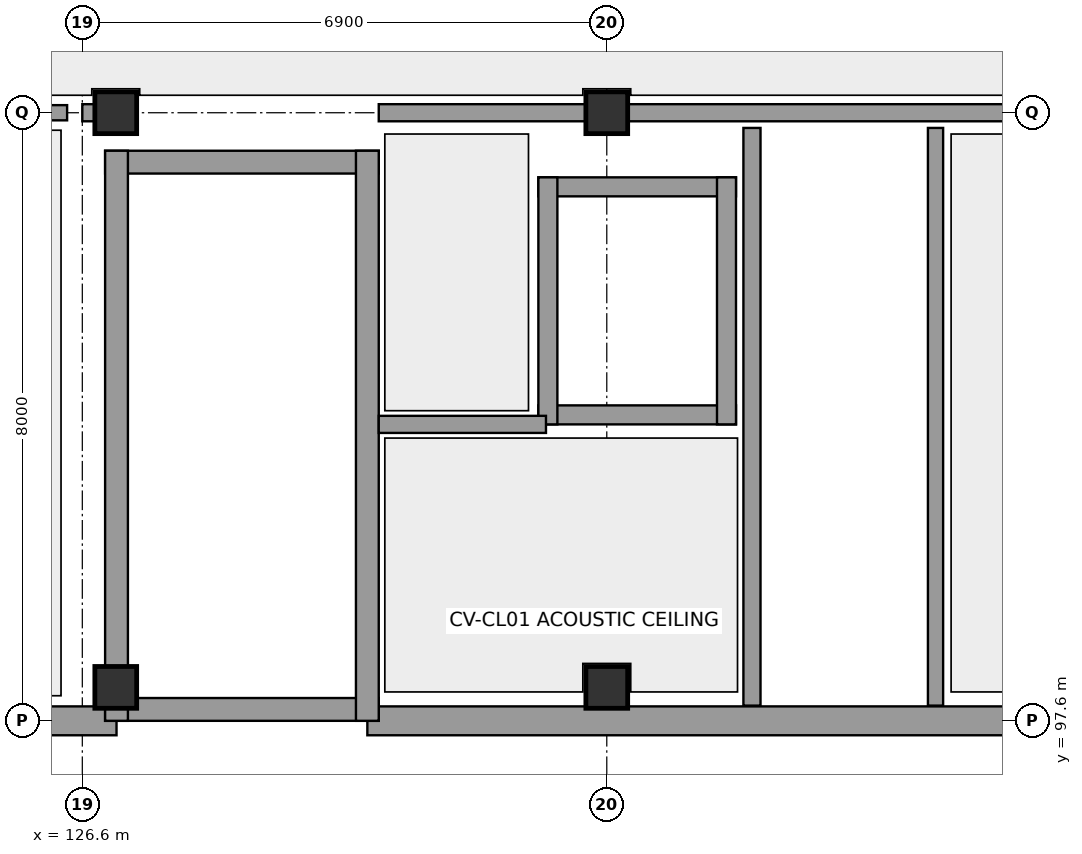
"""IFC4 building model, lengths in metres.
Left out: names, types, materials, properties, quantities, classifications, styles, units other than length and angle.
Written with IfcOpenShell. Run it as: python <this file> out.ifc"""

import sys

from ifc_helpers import new_model, si_unit, direction, frame, frame_2d, origin, origin_with_axes, origin_2d, place, context, subcontext, project, spatial, rectangle, extrude, element, fill, save


model = new_model("IFC4")
c1 = context("Model", 3, precision=1e-05, world=origin(), true_north=direction((0.0, 1.0)))
c2 = subcontext(c1, "Body", "Model", "MODEL_VIEW")
j1 = project(units=[si_unit("LENGTHUNIT", "METRE"), si_unit("PLANEANGLEUNIT", "RADIAN")], contexts=[c1])
p1 = place(None, origin())
s1 = spatial("IfcSite", under=j1, at=p1, CompositionType="ELEMENT")
p2 = place(p1, origin())
s2 = spatial("IfcBuilding", under=s1, at=p2, CompositionType="ELEMENT")
p3 = place(p2, origin())
s3 = spatial("IfcBuildingStorey", under=s2, at=p3, CompositionType="ELEMENT", Elevation=0.0)
for number, where, z_axis, x_axis in (
    (1, (127.04, 98.04, 0.0), (0.0, 0.0, 1.0), (1.0, 0.0, 0.0)),
    (2, (127.04, 105.6, 0.0), (0.0, 0.0, 1.0), (1.0, 0.0, 0.0)),
    (3, (133.5, 98.04, 0.0), (0.0, 0.0, 1.0), (1.0, 0.0, 0.0)),
    (4, (133.5, 105.6, 0.0), (0.0, 0.0, 1.0), (1.0, 0.0, 0.0)),
):
    element("IfcColumn", number, at=place(p3, frame(where, z_axis=z_axis, x_axis=x_axis)), inside=s3, PredefinedType="COLUMN", context=c2, shape_type="SweptSolid", body=[
        extrude(rectangle(XDim=0.55, YDim=0.55, at=origin_2d()), origin(), (0.0, 0.0, 1.0), 4.4),
    ])
p4 = place(p3, frame((125.65, 97.6, 0.0), z_axis=(0.0, 0.0, 1.0), x_axis=(1.0, 0.0, 0.0)))
e5 = element("IfcWall", 5, at=p4, inside=s3, PredefinedType="STANDARD", context=c2, shape_type="SweptSolid", body=[
    extrude(rectangle(XDim=1.4, YDim=0.38, at=frame_2d((0.7, 0.0))), origin(), (0.0, 0.0, 1.0), 4.12),
])
p5 = place(p3, frame((130.35, 97.6, 0.0), z_axis=(0.0, 0.0, 1.0), x_axis=(1.0, 0.0, 0.0)))
e6 = element("IfcWall", 6, at=p5, inside=s3, PredefinedType="STANDARD", context=c2, shape_type="SweptSolid", body=[
    extrude(rectangle(XDim=11.0, YDim=0.38, at=frame_2d((5.5, 0.0))), origin(), (0.0, 0.0, 1.0), 4.12),
])
p6 = place(p3, frame((126.9, 97.75, 0.0), z_axis=(0.0, 0.0, 1.0), x_axis=(1.0, 0.0, 0.0)))
e7 = element("IfcWall", 7, at=p6, inside=s3, PredefinedType="SHEAR", context=c2, shape_type="SweptSolid", body=[
    extrude(rectangle(XDim=3.6, YDim=0.3, at=frame_2d((1.8, 0.0))), origin(), (0.0, 0.0, 1.0), 4.12),
])
p7 = place(p6, frame((1.1, 0.0, 0.0)))
e8 = element("IfcOpeningElement", 8, at=p7, cuts=e7, PredefinedType="OPENING", context=c2, shape_type="SweptSolid", body=[
    extrude(rectangle(XDim=1.4, YDim=2.25, at=frame_2d((0.7, 1.125))), frame((0.0, 0.162, 0.0), z_axis=(0.0, -1.0, 0.0), x_axis=(1.0, 0.0, 0.0)), (0.0, 0.0, 1.0), 0.324),
])
p8 = place(p3, frame((126.9, 104.95, 0.0), z_axis=(0.0, 0.0, 1.0), x_axis=(1.0, 0.0, 0.0)))
e9 = element("IfcWall", 9, at=p8, inside=s3, PredefinedType="SHEAR", context=c2, shape_type="SweptSolid", body=[
    extrude(rectangle(XDim=3.6, YDim=0.3, at=frame_2d((1.8, 0.0))), origin(), (0.0, 0.0, 1.0), 4.12),
])
p9 = place(p3, frame((127.05, 97.6, 0.0), z_axis=(0.0, 0.0, 1.0), x_axis=(0.0, 1.0, 0.0)))
e10 = element("IfcWall", 10, at=p9, inside=s3, PredefinedType="SHEAR", context=c2, shape_type="SweptSolid", body=[
    extrude(rectangle(XDim=7.5, YDim=0.3, at=frame_2d((3.75, 0.0))), origin(), (0.0, 0.0, 1.0), 4.12),
])
p10 = place(p3, frame((130.35, 97.6, 0.0), z_axis=(0.0, 0.0, 1.0), x_axis=(0.0, 1.0, 0.0)))
e11 = element("IfcWall", 11, at=p10, inside=s3, PredefinedType="SHEAR", context=c2, shape_type="SweptSolid", body=[
    extrude(rectangle(XDim=7.5, YDim=0.3, at=frame_2d((3.75, 0.0))), origin(), (0.0, 0.0, 1.0), 4.12),
])
p11 = place(p10, frame((0.65, 0.0, 0.0)))
e12 = element("IfcOpeningElement", 12, at=p11, cuts=e11, PredefinedType="OPENING", context=c2, shape_type="SweptSolid", body=[
    extrude(rectangle(XDim=1.15, YDim=2.15, at=frame_2d((0.575, 1.075))), frame((0.0, 0.162, 0.0), z_axis=(0.0, -1.0, 0.0), x_axis=(1.0, 0.0, 0.0)), (0.0, 0.0, 1.0), 0.324),
])
p12 = place(p3, frame((132.6, 101.625, 0.0), z_axis=(0.0, 0.0, 1.0), x_axis=(1.0, 0.0, 0.0)))
e13 = element("IfcWall", 13, at=p12, inside=s3, PredefinedType="SHEAR", context=c2, shape_type="SweptSolid", body=[
    extrude(rectangle(XDim=2.6, YDim=0.25, at=frame_2d((1.3, 0.0))), origin(), (0.0, 0.0, 1.0), 4.12),
])
p13 = place(p12, frame((0.875, 0.0, 0.0)))
e14 = element("IfcOpeningElement", 14, at=p13, cuts=e13, PredefinedType="OPENING", context=c2, shape_type="SweptSolid", body=[
    extrude(rectangle(XDim=1.1, YDim=2.1, at=frame_2d((0.55, 1.05))), frame((0.0, 0.137, 0.0), z_axis=(0.0, -1.0, 0.0), x_axis=(1.0, 0.0, 0.0)), (0.0, 0.0, 1.0), 0.274),
])
p14 = place(p3, frame((132.6, 104.625, 0.0), z_axis=(0.0, 0.0, 1.0), x_axis=(1.0, 0.0, 0.0)))
e15 = element("IfcWall", 15, at=p14, inside=s3, PredefinedType="SHEAR", context=c2, shape_type="SweptSolid", body=[
    extrude(rectangle(XDim=2.6, YDim=0.25, at=frame_2d((1.3, 0.0))), origin(), (0.0, 0.0, 1.0), 4.12),
])
for number, where, z_axis, x_axis in (
    (16, (132.725, 101.5, 0.0), (0.0, 0.0, 1.0), (0.0, 1.0, 0.0)),
    (17, (135.075, 101.5, 0.0), (0.0, 0.0, 1.0), (0.0, 1.0, 0.0)),
):
    element("IfcWall", number, at=place(p3, frame(where, z_axis=z_axis, x_axis=x_axis)), inside=s3, PredefinedType="SHEAR", context=c2, shape_type="SweptSolid", body=[
        extrude(rectangle(XDim=3.25, YDim=0.25, at=frame_2d((1.625, 0.0))), origin(), (0.0, 0.0, 1.0), 4.12),
    ])
p15 = place(p3, frame((135.41, 97.8, 0.0), z_axis=(0.0, 0.0, 1.0), x_axis=(0.0, 1.0, 0.0)))
e18 = element("IfcWall", 18, at=p15, inside=s3, PredefinedType="PARTITIONING", context=c2, shape_type="SweptSolid", body=[
    extrude(rectangle(XDim=7.6, YDim=0.225, at=frame_2d((3.8, 0.0))), origin(), (0.0, 0.0, 1.0), 4.12),
])
p16 = place(p3, frame((130.5, 101.5, 0.0), z_axis=(0.0, 0.0, 1.0), x_axis=(1.0, 0.0, 0.0)))
e19 = element("IfcWall", 19, at=p16, inside=s3, PredefinedType="PARTITIONING", context=c2, shape_type="SweptSolid", body=[
    extrude(rectangle(XDim=2.2, YDim=0.225, at=frame_2d((1.1, 0.0))), origin(), (0.0, 0.0, 1.0), 4.12),
])
p17 = place(p16, frame((0.45, 0.0, 0.0)))
e20 = element("IfcOpeningElement", 20, at=p17, cuts=e19, PredefinedType="OPENING", context=c2, shape_type="SweptSolid", body=[
    extrude(rectangle(XDim=1.1, YDim=2.15, at=frame_2d((0.55, 1.075))), frame((0.0, 0.125, 0.0), z_axis=(0.0, -1.0, 0.0), x_axis=(1.0, 0.0, 0.0)), (0.0, 0.0, 1.0), 0.249),
])
p18 = place(p3, frame((126.6, 105.6, 0.0), z_axis=(0.0, 0.0, 1.0), x_axis=(1.0, 0.0, 0.0)))
e21 = element("IfcWall", 21, at=p18, inside=s3, PredefinedType="PARTITIONING", context=c2, shape_type="SweptSolid", body=[
    extrude(rectangle(XDim=0.3, YDim=0.225, at=frame_2d((0.15, 0.0))), origin(), (0.0, 0.0, 1.0), 4.12),
])
p19 = place(p3, frame((137.825, 97.8, 0.0), z_axis=(0.0, 0.0, 1.0), x_axis=(0.0, 1.0, 0.0)))
e22 = element("IfcWall", 22, at=p19, inside=s3, PredefinedType="PARTITIONING", context=c2, shape_type="SweptSolid", body=[
    extrude(rectangle(XDim=7.6, YDim=0.2, at=frame_2d((3.8, 0.0))), origin(), (0.0, 0.0, 1.0), 4.12),
])
p20 = place(p3, frame((130.5, 105.6, 0.0), z_axis=(0.0, 0.0, 1.0), x_axis=(1.0, 0.0, 0.0)))
e23 = element("IfcWall", 23, at=p20, inside=s3, PredefinedType="PARTITIONING", context=c2, shape_type="SweptSolid", body=[
    extrude(rectangle(XDim=9.9, YDim=0.225, at=frame_2d((4.95, 0.0))), origin(), (0.0, 0.0, 1.0), 3.56),
])
p21 = place(p20, frame((0.475, 0.0, 0.0)))
e24 = element("IfcOpeningElement", 24, at=p21, cuts=e23, PredefinedType="OPENING", context=c2, shape_type="SweptSolid", body=[
    extrude(rectangle(XDim=1.1, YDim=2.15, at=frame_2d((0.55, 1.075))), frame((0.0, 0.125, 0.0), z_axis=(0.0, -1.0, 0.0), x_axis=(1.0, 0.0, 0.0)), (0.0, 0.0, 1.0), 0.249),
])
p22 = place(p20, frame((5.75, 0.0, 0.0)))
e25 = element("IfcOpeningElement", 25, at=p22, cuts=e23, PredefinedType="OPENING", context=c2, shape_type="SweptSolid", body=[
    extrude(rectangle(XDim=0.9, YDim=2.1, at=frame_2d((0.45, 1.05))), frame((0.0, 0.125, 0.0), z_axis=(0.0, -1.0, 0.0), x_axis=(1.0, 0.0, 0.0)), (0.0, 0.0, 1.0), 0.249),
])
p23 = place(p20, frame((7.8, 0.0, 0.0)))
e26 = element("IfcOpeningElement", 26, at=p23, cuts=e23, PredefinedType="OPENING", context=c2, shape_type="SweptSolid", body=[
    extrude(rectangle(XDim=0.95, YDim=2.15, at=frame_2d((0.475, 1.075))), frame((0.0, 0.125, 0.0), z_axis=(0.0, -1.0, 0.0), x_axis=(1.0, 0.0, 0.0)), (0.0, 0.0, 1.0), 0.249),
])
p24 = place(p3, frame((113.05, 105.6, 0.0), z_axis=(0.0, 0.0, 1.0), x_axis=(1.0, 0.0, 0.0)))
e27 = element("IfcWall", 27, at=p24, inside=s3, PredefinedType="PARTITIONING", context=c2, shape_type="SweptSolid", body=[
    extrude(rectangle(XDim=13.35, YDim=0.2, at=frame_2d((6.675, 0.0))), origin(), (0.0, 0.0, 1.0), 3.56),
])
p25 = place(p24, frame((1.9, 0.0, 0.0)))
e28 = element("IfcOpeningElement", 28, at=p25, cuts=e27, PredefinedType="OPENING", context=c2, shape_type="SweptSolid", body=[
    extrude(rectangle(XDim=0.95, YDim=2.15, at=frame_2d((0.475, 1.075))), frame((0.0, 0.112, 0.0), z_axis=(0.0, -1.0, 0.0), x_axis=(1.0, 0.0, 0.0)), (0.0, 0.0, 1.0), 0.224),
])
p26 = place(p7, frame((1.4, 0.0, 0.0), z_axis=(0.0, 0.0, 1.0), x_axis=(-1.0, 0.0, 0.0)))
e29 = element("IfcDoor", 29, at=p26, inside=s3, OperationType="DOUBLE_DOOR_SINGLE_SWING", PredefinedType="DOOR", context=c2, shape_type="SweptSolid", body=[
    extrude(rectangle(XDim=1.4, YDim=2.25, at=frame_2d((0.7, 1.125))), frame((0.0, 0.025, 0.0), z_axis=(0.0, -1.0, 0.0), x_axis=(1.0, 0.0, 0.0)), (0.0, 0.0, 1.0), 0.05),
])
fill(e8, e29)
p27 = place(p11, origin_with_axes())
e30 = element("IfcDoor", 30, at=p27, inside=s3, OperationType="SINGLE_SWING_RIGHT", PredefinedType="DOOR", context=c2, shape_type="SweptSolid", body=[
    extrude(rectangle(XDim=1.15, YDim=2.15, at=frame_2d((0.575, 1.075))), frame((0.0, 0.025, 0.0), z_axis=(0.0, -1.0, 0.0), x_axis=(1.0, 0.0, 0.0)), (0.0, 0.0, 1.0), 0.05),
])
fill(e12, e30)
p28 = place(p13, origin_with_axes())
e31 = element("IfcDoor", 31, at=p28, inside=s3, OperationType="SLIDING_TO_LEFT", PredefinedType="DOOR", context=c2, shape_type="SweptSolid", body=[
    extrude(rectangle(XDim=1.1, YDim=2.1, at=frame_2d((0.55, 1.05))), frame((0.0, 0.025, 0.0), z_axis=(0.0, -1.0, 0.0), x_axis=(1.0, 0.0, 0.0)), (0.0, 0.0, 1.0), 0.05),
])
fill(e14, e31)
p29 = place(p17, frame((1.1, 0.0, 0.0), z_axis=(0.0, 0.0, 1.0), x_axis=(-1.0, 0.0, 0.0)))
e32 = element("IfcDoor", 32, at=p29, inside=s3, OperationType="SINGLE_SWING_RIGHT", PredefinedType="DOOR", context=c2, shape_type="SweptSolid", body=[
    extrude(rectangle(XDim=1.1, YDim=2.15, at=frame_2d((0.55, 1.075))), frame((0.0, 0.025, 0.0), z_axis=(0.0, -1.0, 0.0), x_axis=(1.0, 0.0, 0.0)), (0.0, 0.0, 1.0), 0.05),
])
fill(e20, e32)
p30 = place(p21, frame((1.1, 0.0, 0.0), z_axis=(0.0, 0.0, 1.0), x_axis=(-1.0, 0.0, 0.0)))
e33 = element("IfcDoor", 33, at=p30, inside=s3, OperationType="SINGLE_SWING_LEFT", PredefinedType="DOOR", context=c2, shape_type="SweptSolid", body=[
    extrude(rectangle(XDim=1.1, YDim=2.15, at=frame_2d((0.55, 1.075))), frame((0.0, 0.025, 0.0), z_axis=(0.0, -1.0, 0.0), x_axis=(1.0, 0.0, 0.0)), (0.0, 0.0, 1.0), 0.05),
])
fill(e24, e33)
p31 = place(p22, origin_with_axes())
e34 = element("IfcDoor", 34, at=p31, inside=s3, OperationType="SINGLE_SWING_LEFT", PredefinedType="DOOR", context=c2, shape_type="SweptSolid", body=[
    extrude(rectangle(XDim=0.9, YDim=2.1, at=frame_2d((0.45, 1.05))), frame((0.0, 0.025, 0.0), z_axis=(0.0, -1.0, 0.0), x_axis=(1.0, 0.0, 0.0)), (0.0, 0.0, 1.0), 0.05),
])
fill(e25, e34)
p32 = place(p23, origin_with_axes())
e35 = element("IfcDoor", 35, at=p32, inside=s3, OperationType="SINGLE_SWING_RIGHT", PredefinedType="DOOR", context=c2, shape_type="SweptSolid", body=[
    extrude(rectangle(XDim=0.95, YDim=2.15, at=frame_2d((0.475, 1.075))), frame((0.0, 0.025, 0.0), z_axis=(0.0, -1.0, 0.0), x_axis=(1.0, 0.0, 0.0)), (0.0, 0.0, 1.0), 0.05),
])
fill(e26, e35)
save(model, sys.argv[1])
